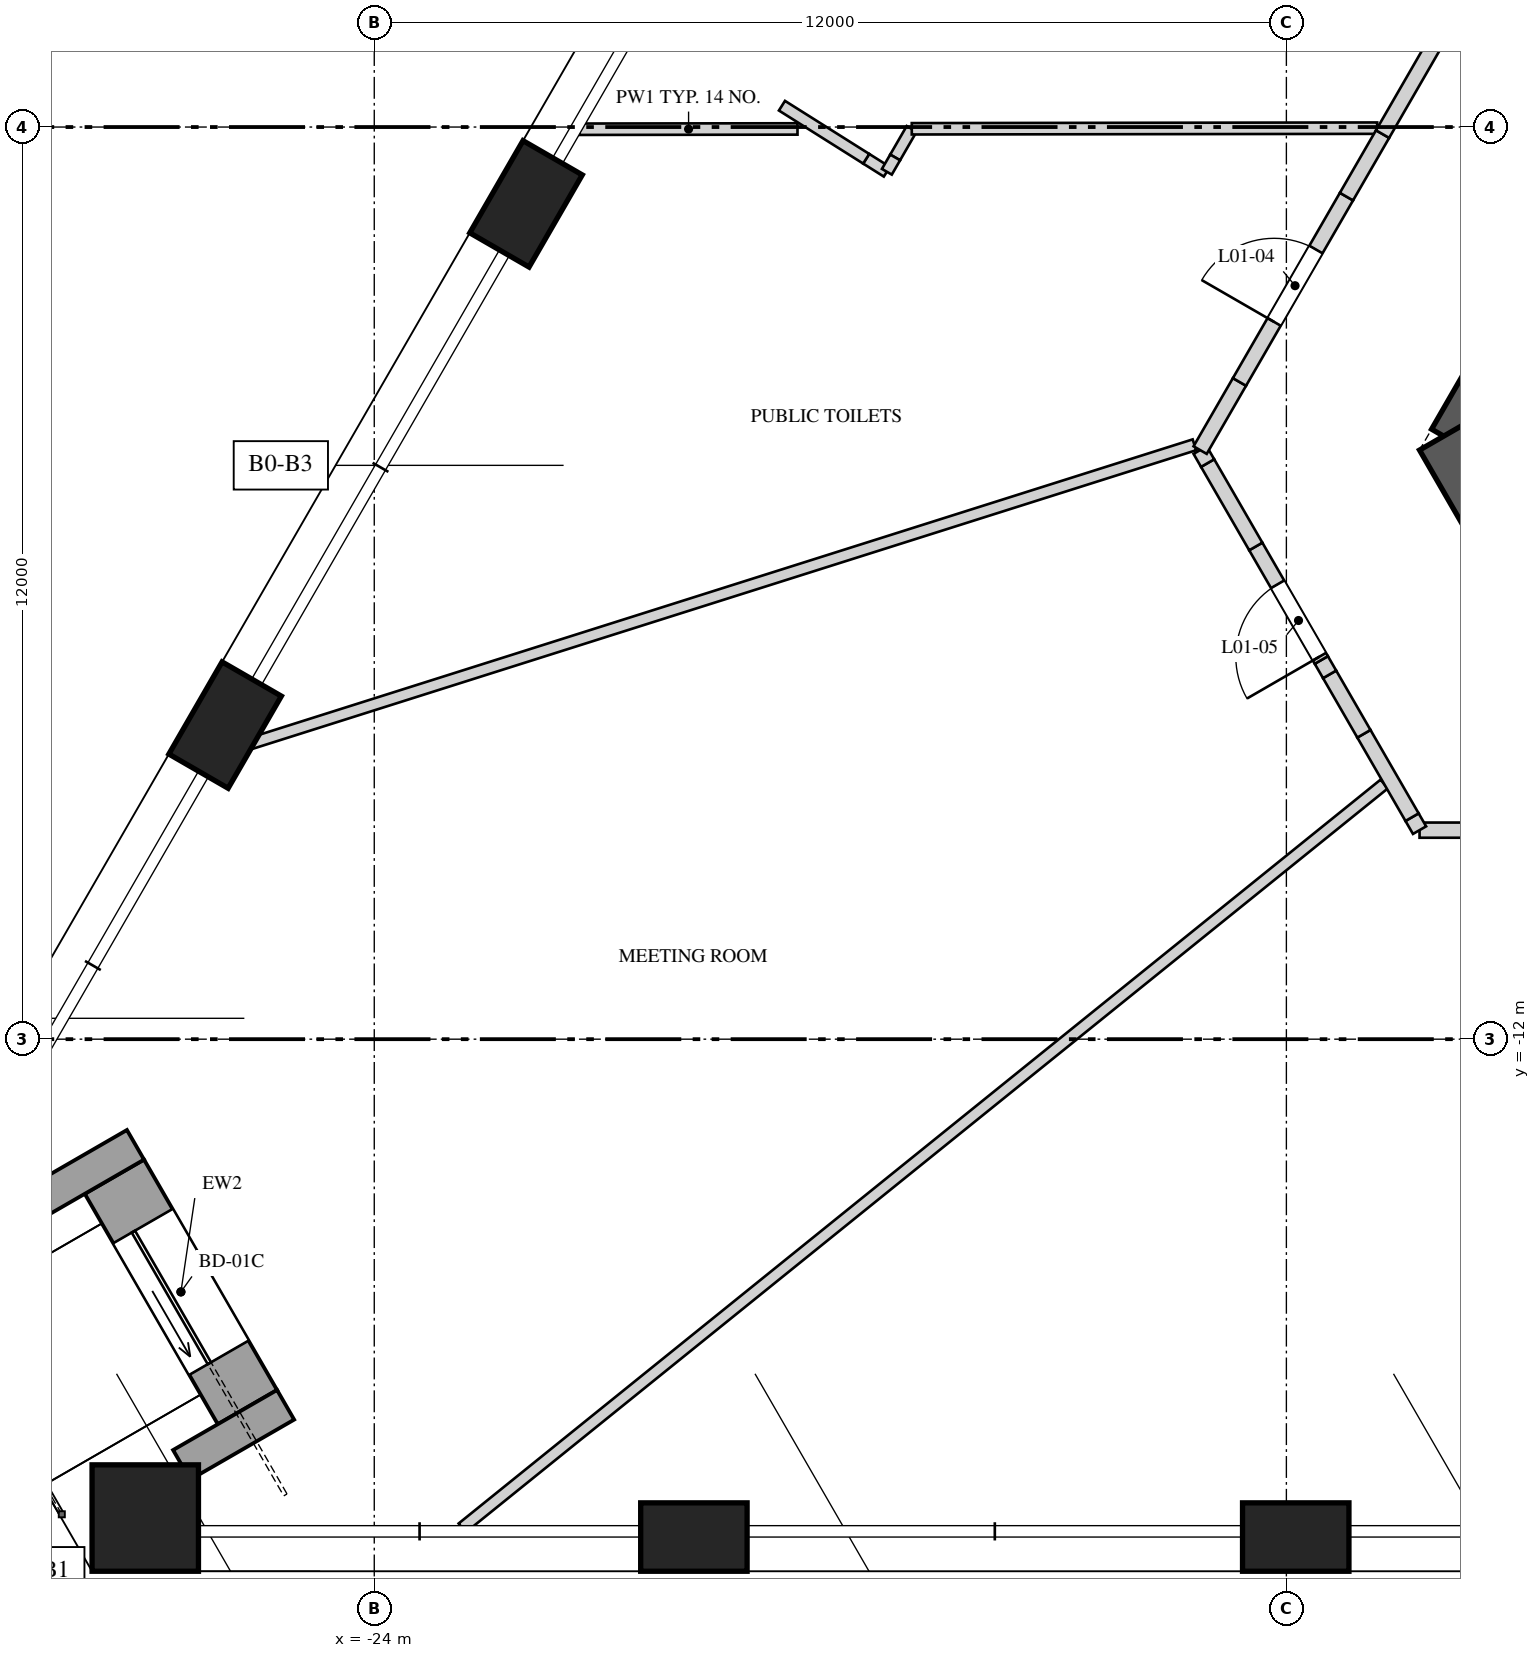
"""IFC4 building model, lengths in metres.
Left out: names, types, materials, properties, quantities, classifications, styles, units other than length and angle.
Written with IfcOpenShell. Run it as: python <this file> out.ifc"""

import sys

from ifc_helpers import new_model, si_unit, direction, frame, frame_2d, origin, origin_2d, place, context, subcontext, project, spatial, polyline, rectangle, outline, extrude, element, fill, save


model = new_model("IFC4")
c1 = context("Model", 3, precision=1e-05, world=origin(), true_north=direction((0.0, 1.0)))
c2 = subcontext(c1, "Body", "Model", "MODEL_VIEW")
j1 = project(units=[si_unit("LENGTHUNIT", "METRE"), si_unit("PLANEANGLEUNIT", "RADIAN")], contexts=[c1])
p1 = place(None, origin())
s1 = spatial("IfcSite", under=j1, at=p1, CompositionType="ELEMENT")
p2 = place(p1, origin())
s2 = spatial("IfcBuilding", under=s1, at=p2, CompositionType="ELEMENT")
p3 = place(p2, frame((0.0, 0.0, 10.0)))
s3 = spatial("IfcBuildingStorey", under=s2, at=p3, CompositionType="ELEMENT", Elevation=10.0)
p4 = place(p3, frame((-1.126, 10.45, 0.0), z_axis=(0.0, 0.0, 1.0), x_axis=(-0.500001757713, -0.866024388966, 0.0)))
e1 = element("IfcWall", 1, at=p4, inside=s3, PredefinedType="SHEAR", context=c2, shape_type="SweptSolid", body=[
    extrude(rectangle(XDim=16.974, YDim=1.1, at=frame_2d((8.487, 0.0))), origin(), (0.0, 0.0, 1.0), 5.0),
])
p5 = place(p4, frame((6.692, 0.0, 0.0)))
e2 = element("IfcOpeningElement", 2, at=p5, cuts=e1, PredefinedType="OPENING", context=c2, shape_type="SweptSolid", body=[
    extrude(rectangle(XDim=1.0, YDim=2.4, at=frame_2d((0.5, 1.2))), frame((0.0, 0.56, 0.0), z_axis=(0.0, -1.0, 0.0), x_axis=(1.0, 0.0, 0.0)), (0.0, 0.0, 1.0), 1.12),
])
p6 = place(p4, frame((14.397, 0.0, 0.0)))
e3 = element("IfcOpeningElement", 3, at=p6, cuts=e1, PredefinedType="OPENING", context=c2, shape_type="SweptSolid", body=[
    extrude(rectangle(XDim=0.8, YDim=2.1, at=frame_2d((0.4, 1.05))), frame((0.0, 0.56, 0.0), z_axis=(0.0, -1.0, 0.0), x_axis=(1.0, 0.0, 0.0)), (0.0, 0.0, 1.0), 1.12),
])
p7 = place(p3, frame((-9.772, -3.975, 0.0), z_axis=(0.0, 0.0, 1.0), x_axis=(0.499995765644, -0.866027848477, 0.0)))
e4 = element("IfcWall", 4, at=p7, inside=s3, PredefinedType="SHEAR", context=c2, shape_type="SweptSolid", body=[
    extrude(rectangle(XDim=2.887, YDim=1.1, at=frame_2d((1.443, 0.0))), origin(), (0.0, 0.0, 1.0), 5.0),
])
for number, where, z_axis, x_axis in (
    (5, (-22.003, -1.011, 0.0), (0.0, 0.0, 1.0), (-0.5, -0.866, 0.0)),
    (6, (-25.962, -7.868, 0.0), (0.0, 0.0, 1.0), (-0.5, -0.866, 0.0)),
):
    element("IfcColumn", number, at=place(p3, frame(where, z_axis=z_axis, x_axis=x_axis)), inside=s3, PredefinedType="COLUMN", context=c2, shape_type="SweptSolid", body=[
        extrude(rectangle(XDim=1.4, YDim=0.9, at=origin_2d()), origin(), (0.0, 0.0, 1.0), 5.0),
    ])
p8 = place(p3, frame((-27.013, -18.3, 0.0), z_axis=(0.0, 0.0, 1.0), x_axis=(1.0, 0.0, 0.0)))
e7 = element("IfcColumn", 7, at=p8, inside=s3, PredefinedType="COLUMN", context=c2, shape_type="SweptSolid", body=[
    extrude(rectangle(XDim=1.4, YDim=1.4, at=origin_2d()), origin(), (0.0, 0.0, 1.0), 5.0),
])
for number, where, z_axis, x_axis in (
    (8, (-19.795, -18.55, 0.0), (0.0, 0.0, 1.0), (1.0, 0.0, 0.0)),
    (9, (-11.877, -18.55, 0.0), (0.0, 0.0, 1.0), (1.0, 0.0, 0.0)),
):
    element("IfcColumn", number, at=place(p3, frame(where, z_axis=z_axis, x_axis=x_axis)), inside=s3, PredefinedType="COLUMN", context=c2, shape_type="SweptSolid", body=[
        extrude(rectangle(XDim=1.4, YDim=0.9, at=origin_2d()), origin(), (0.0, 0.0, 1.0), 5.0),
    ])
p9 = place(p3, frame((-25.669, -16.841, 0.0), z_axis=(0.0, 0.0, 1.0), x_axis=(-0.500010275428, 0.866019471182, 0.0)))
e10 = element("IfcWall", 10, at=p9, inside=s3, PredefinedType="SOLIDWALL", context=c2, shape_type="SweptSolid", body=[
    extrude(rectangle(XDim=3.5, YDim=0.9, at=frame_2d((1.75, 0.0))), origin(), (0.0, 0.0, 1.0), 4.3),
])
p10 = place(p9, frame((0.75, 0.0, 0.0)))
e11 = element("IfcOpeningElement", 11, at=p10, cuts=e10, PredefinedType="OPENING", context=c2, shape_type="SweptSolid", body=[
    extrude(rectangle(XDim=2.0, YDim=2.4, at=frame_2d((1.0, 1.2))), frame((0.0, 0.46, 0.0), z_axis=(0.0, -1.0, 0.0), x_axis=(1.0, 0.0, 0.0)), (0.0, 0.0, 1.0), 0.92),
])
p11 = place(p3, frame((-26.534, -17.6, 0.0), z_axis=(0.0, 0.0, 1.0), x_axis=(0.86597962928, 0.500079275387, 0.0)))
e12 = element("IfcWall", 12, at=p11, inside=s3, PredefinedType="SOLIDWALL", context=c2, shape_type="SweptSolid", body=[
    extrude(rectangle(XDim=1.579, YDim=0.45, at=frame_2d((0.79, 0.0))), origin(), (0.0, 0.0, 1.0), 2.55),
])
p12 = place(p3, frame((-28.509, -14.179, 0.0), z_axis=(0.0, 0.0, 1.0), x_axis=(0.866046570609, 0.499963336192, 0.0)))
e13 = element("IfcWall", 13, at=p12, inside=s3, PredefinedType="SOLIDWALL", context=c2, shape_type="SweptSolid", body=[
    extrude(rectangle(XDim=1.579, YDim=0.45, at=frame_2d((0.79, 0.0))), origin(), (0.0, 0.0, 1.0), 2.55),
])
p13 = place(p3, frame((-18.432, -0.025, 0.0), z_axis=(0.0, 0.0, 1.0), x_axis=(-0.999999071147, -0.001362976841, 0.0)))
e14 = element("IfcWall", 14, at=p13, inside=s3, PredefinedType="PARTITIONING", context=c2, shape_type="SweptSolid", body=[
    extrude(rectangle(XDim=2.866, YDim=0.15, at=frame_2d((1.433, 0.0))), origin(), (0.0, 0.0, 1.0), 4.65),
])
p14 = place(p3, frame((-17.256, -0.588, 0.0), z_axis=(0.0, 0.0, 1.0), x_axis=(-0.846156657223, 0.532934246823, 0.0)))
e15 = element("IfcWall", 15, at=p14, inside=s3, PredefinedType="PARTITIONING", context=c2, shape_type="SweptSolid", body=[
    extrude(rectangle(XDim=0.321, YDim=0.15, at=frame_2d((0.161, 0.0))), origin(), (0.0, 0.0, 1.0), 3.75),
])
p15 = place(p3, frame((-17.528, -0.417, 0.0), z_axis=(0.0, 0.0, 1.0), x_axis=(-0.846108327914, 0.533010973091, 0.0)))
e16 = element("IfcWall", 16, at=p15, inside=s3, PredefinedType="PARTITIONING", context=c2, shape_type="SweptSolid", body=[
    extrude(rectangle(XDim=1.31, YDim=0.15, at=frame_2d((0.655, 0.0))), origin(), (0.0, 0.0, 1.0), 4.65),
])
p16 = place(p3, frame((-16.93, -0.024, 0.0), z_axis=(0.0, 0.0, 1.0), x_axis=(-0.500193229689, -0.865913813825, 0.0)))
e17 = element("IfcWall", 17, at=p16, inside=s3, PredefinedType="PARTITIONING", context=c2, shape_type="SweptSolid", body=[
    extrude(rectangle(XDim=0.434, YDim=0.15, at=frame_2d((0.217, 0.0))), origin(), (0.0, 0.0, 1.0), 4.65),
])
p17 = place(p3, frame((-17.147, -0.4, 0.0), z_axis=(0.0, 0.0, 1.0), x_axis=(-0.499754787977, -0.866166930732, 0.0)))
e18 = element("IfcWall", 18, at=p17, inside=s3, PredefinedType="PARTITIONING", context=c2, shape_type="SweptSolid", body=[
    extrude(rectangle(XDim=0.218, YDim=0.15, at=frame_2d((0.109, 0.0))), origin(), (0.0, 0.0, 1.0), 3.75),
])
p18 = place(p3, frame((-13.21, -4.181, 0.0), z_axis=(0.0, 0.0, 1.0), x_axis=(-0.953395736476, -0.301722670128, 0.0)))
e19 = element("IfcWall", 19, at=p18, inside=s3, PredefinedType="PARTITIONING", context=c2, shape_type="SweptSolid", body=[
    extrude(rectangle(XDim=13.456, YDim=0.15, at=frame_2d((6.728, 0.0))), origin(), (0.0, 0.0, 1.0), 3.55),
])
p19 = place(p3, frame((-10.805, -0.015, 0.0), z_axis=(0.0, 0.0, 1.0), x_axis=(-0.999999081238, -0.001355552538, 0.0)))
e20 = element("IfcWall", 20, at=p19, inside=s3, PredefinedType="PARTITIONING", context=c2, shape_type="SweptSolid", body=[
    extrude(rectangle(XDim=6.124, YDim=0.15, at=frame_2d((3.062, 0.0))), origin(), (0.0, 0.0, 1.0), 4.65),
])
p20 = place(p3, frame((-10.714, -8.644, 0.0), z_axis=(0.0, 0.0, 1.0), x_axis=(-0.77828239895, -0.627914410955, 0.0)))
e21 = element("IfcWall", 21, at=p20, inside=s3, PredefinedType="PARTITIONING", context=c2, shape_type="SweptSolid", body=[
    extrude(rectangle(XDim=15.585, YDim=0.15, at=frame_2d((7.792, 0.0))), origin(), (0.0, 0.0, 1.0), 4.65),
])
p21 = place(p3, frame((-9.213, -9.25, 0.0), z_axis=(0.0, 0.0, 1.0), x_axis=(-1.0, 0.0, 0.0)))
e22 = element("IfcWall", 22, at=p21, inside=s3, PredefinedType="SOLIDWALL", context=c2, shape_type="SweptSolid", body=[
    extrude(rectangle(XDim=1.035, YDim=0.2, at=frame_2d((0.518, 0.0))), origin(), (0.0, 0.0, 1.0), 3.55),
])
p22 = place(p3, frame((-10.248, -9.25, 0.0), z_axis=(0.0, 0.0, 1.0), x_axis=(-0.499865263774, 0.866103179807, 0.0)))
e23 = element("IfcWall", 23, at=p22, inside=s3, PredefinedType="SOLIDWALL", context=c2, shape_type="SweptSolid", body=[
    extrude(rectangle(XDim=0.197, YDim=0.2, at=frame_2d((0.099, 0.0))), origin(), (0.0, 0.0, 1.0), 3.55),
])
p23 = place(p3, frame((-10.347, -9.079, 0.0), z_axis=(0.0, 0.0, 1.0), x_axis=(-0.499911523785, 0.866076479525, 0.0)))
e24 = element("IfcWall", 24, at=p23, inside=s3, PredefinedType="SOLIDWALL", context=c2, shape_type="SweptSolid", body=[
    extrude(rectangle(XDim=1.267, YDim=0.2, at=frame_2d((0.633, 0.0))), origin(), (0.0, 0.0, 1.0), 4.65),
])
p24 = place(p3, frame((-10.98, -7.982, 0.0), z_axis=(0.0, 0.0, 1.0), x_axis=(-0.500097243556, 0.865969252911, 0.0)))
e25 = element("IfcWall", 25, at=p24, inside=s3, PredefinedType="SOLIDWALL", context=c2, shape_type="SweptSolid", body=[
    extrude(rectangle(XDim=0.902, YDim=0.2, at=frame_2d((0.451, 0.0))), origin(), (0.0, 0.0, 1.0), 3.55),
])
p25 = place(p3, frame((-11.431, -7.201, 0.0), z_axis=(0.0, 0.0, 1.0), x_axis=(-0.499625687879, 0.866241405159, 0.0)))
e26 = element("IfcWall", 26, at=p25, inside=s3, PredefinedType="SOLIDWALL", context=c2, shape_type="SweptSolid", body=[
    extrude(rectangle(XDim=0.219, YDim=0.2, at=frame_2d((0.109, 0.0))), origin(), (0.0, 0.0, 1.0), 4.65),
])
p26 = place(p3, frame((-11.54, -7.011, 0.0), z_axis=(0.0, 0.0, 1.0), x_axis=(-0.500036993012, 0.866004044806, 0.0)))
e27 = element("IfcWall", 27, at=p26, inside=s3, PredefinedType="SOLIDWALL", context=c2, shape_type="SweptSolid", body=[
    extrude(outline(polyline([(0.0, 0.0), (1.724, 0.0), (1.725, 3.55), (0.822, 3.55), (0.822, 4.65), (0.0, 4.65), (0.0, 0.0)])), frame((0.0, 0.1, 0.0), z_axis=(0.0, -1.0, 0.0), x_axis=(1.0, 0.0, 0.0)), (0.0, 0.0, 1.0), 0.2),
])
p27 = place(p26, frame((0.05, 0.0, 0.0)))
e28 = element("IfcOpeningElement", 28, at=p27, cuts=e27, PredefinedType="OPENING", context=c2, shape_type="SweptSolid", body=[
    extrude(rectangle(XDim=1.1, YDim=2.4, at=frame_2d((0.55, 1.2))), frame((0.0, 0.11, 0.0), z_axis=(0.0, -1.0, 0.0), x_axis=(1.0, 0.0, 0.0)), (0.0, 0.0, 1.0), 0.22),
])
p28 = place(p3, frame((-12.403, -5.518, 0.0), z_axis=(0.0, 0.0, 1.0), x_axis=(-0.500056058743, 0.865993035835, 0.0)))
e29 = element("IfcWall", 29, at=p28, inside=s3, PredefinedType="SOLIDWALL", context=c2, shape_type="SweptSolid", body=[
    extrude(rectangle(XDim=1.267, YDim=0.2, at=frame_2d((0.633, 0.0))), origin(), (0.0, 0.0, 1.0), 4.65),
])
p29 = place(p3, frame((-13.036, -4.421, 0.0), z_axis=(0.0, 0.0, 1.0), x_axis=(-0.499865263774, 0.866103179807, 0.0)))
e30 = element("IfcWall", 30, at=p29, inside=s3, PredefinedType="SOLIDWALL", context=c2, shape_type="SweptSolid", body=[
    extrude(rectangle(XDim=0.197, YDim=0.2, at=frame_2d((0.099, 0.0))), origin(), (0.0, 0.0, 1.0), 3.55),
])
p30 = place(p3, frame((-13.135, -4.25, 0.0), z_axis=(0.0, 0.0, 1.0), x_axis=(0.500171514983, 0.865926356915, 0.0)))
e31 = element("IfcWall", 31, at=p30, inside=s3, PredefinedType="SOLIDWALL", context=c2, shape_type="SweptSolid", body=[
    extrude(rectangle(XDim=1.035, YDim=0.2, at=frame_2d((0.518, 0.0))), origin(), (0.0, 0.0, 1.0), 3.55),
])
p31 = place(p3, frame((-12.617, -3.354, 0.0), z_axis=(0.0, 0.0, 1.0), x_axis=(0.49993514545, 0.866062844338, 0.0)))
e32 = element("IfcWall", 32, at=p31, inside=s3, PredefinedType="SOLIDWALL", context=c2, shape_type="SweptSolid", body=[
    extrude(rectangle(XDim=2.815, YDim=0.2, at=frame_2d((1.408, 0.0))), origin(), (0.0, 0.0, 1.0), 4.65),
])
p32 = place(p31, frame((0.912, 0.0, 0.0)))
e33 = element("IfcOpeningElement", 33, at=p32, cuts=e32, PredefinedType="OPENING", context=c2, shape_type="SweptSolid", body=[
    extrude(rectangle(XDim=1.1, YDim=2.4, at=frame_2d((0.55, 1.2))), frame((0.0, 0.11, 0.0), z_axis=(0.0, -1.0, 0.0), x_axis=(1.0, 0.0, 0.0)), (0.0, 0.0, 1.0), 0.22),
])
p33 = place(p3, frame((-11.209, -0.915, 0.0), z_axis=(0.0, 0.0, 1.0), x_axis=(0.500174821557, 0.865924446982, 0.0)))
e34 = element("IfcWall", 34, at=p33, inside=s3, PredefinedType="SOLIDWALL", context=c2, shape_type="SweptSolid", body=[
    extrude(rectangle(XDim=0.95, YDim=0.2, at=frame_2d((0.475, 0.0))), origin(), (0.0, 0.0, 1.0), 3.75),
])
p34 = place(p3, frame((-10.734, -0.093, 0.0), z_axis=(0.0, 0.0, 1.0), x_axis=(0.499952348839, 0.866052913447, 0.0)))
e35 = element("IfcWall", 35, at=p34, inside=s3, PredefinedType="SOLIDWALL", context=c2, shape_type="SweptSolid", body=[
    extrude(rectangle(XDim=3.064, YDim=0.2, at=frame_2d((1.532, 0.0))), origin(), (0.0, 0.0, 1.0), 4.65),
])
p35 = place(p10, origin())
e36 = element("IfcDoor", 36, at=p35, inside=s3, OperationType="SLIDING_TO_LEFT", PredefinedType="DOOR", context=c2, shape_type="SweptSolid", body=[
    extrude(rectangle(XDim=2.0, YDim=2.4, at=frame_2d((1.0, 1.2))), frame((0.0, 0.025, 0.0), z_axis=(0.0, -1.0, 0.0), x_axis=(1.0, 0.0, 0.0)), (0.0, 0.0, 1.0), 0.05),
])
fill(e11, e36)
p36 = place(p32, origin())
e37 = element("IfcDoor", 37, at=p36, inside=s3, OperationType="SINGLE_SWING_RIGHT", PredefinedType="DOOR", context=c2, shape_type="SweptSolid", body=[
    extrude(rectangle(XDim=1.1, YDim=2.4, at=frame_2d((0.55, 1.2))), frame((0.0, 0.025, 0.0), z_axis=(0.0, -1.0, 0.0), x_axis=(1.0, 0.0, 0.0)), (0.0, 0.0, 1.0), 0.05),
])
fill(e33, e37)
p37 = place(p27, origin())
e38 = element("IfcDoor", 38, at=p37, inside=s3, OperationType="SINGLE_SWING_LEFT", PredefinedType="DOOR", context=c2, shape_type="SweptSolid", body=[
    extrude(rectangle(XDim=1.1, YDim=2.4, at=frame_2d((0.55, 1.2))), frame((0.0, 0.025, 0.0), z_axis=(0.0, -1.0, 0.0), x_axis=(1.0, 0.0, 0.0)), (0.0, 0.0, 1.0), 0.05),
])
fill(e28, e38)
save(model, sys.argv[1])
